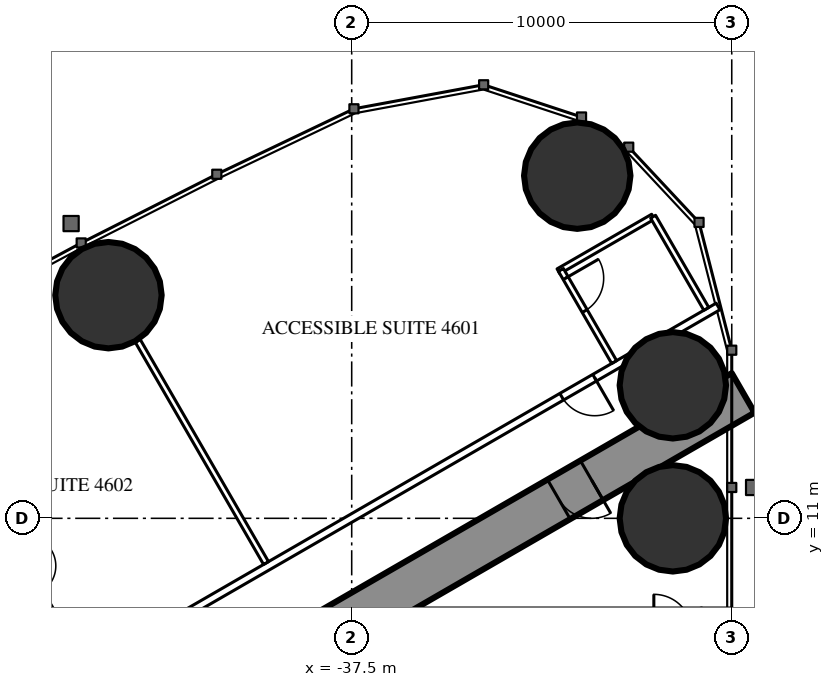
"""IFC4 building model, lengths in metres.
Left out: names, types, materials, properties, quantities, classifications, styles, units other than length and angle.
Written with IfcOpenShell. Run it as: python <this file> out.ifc"""

import sys

from ifc_helpers import new_model, si_unit, direction, frame, frame_2d, origin, origin_2d, place, context, subcontext, project, spatial, rectangle, circle, extrude, element, fill, save


model = new_model("IFC4")
c1 = context("Model", 3, precision=1e-05, world=origin(), true_north=direction((0.0, 1.0)))
c2 = subcontext(c1, "Body", "Model", "MODEL_VIEW")
j1 = project(units=[si_unit("LENGTHUNIT", "METRE"), si_unit("PLANEANGLEUNIT", "RADIAN")], contexts=[c1])
p1 = place(None, origin())
s1 = spatial("IfcSite", under=j1, at=p1, CompositionType="ELEMENT")
p2 = place(p1, origin())
s2 = spatial("IfcBuilding", under=s1, at=p2, CompositionType="ELEMENT")
p3 = place(p2, frame((0.0, 0.0, 173.8)))
s3 = spatial("IfcBuildingStorey", under=s2, at=p3, CompositionType="ELEMENT", Elevation=173.8)
for number, where, z_axis, x_axis in (
    (1, (-31.565, 20.016, 0.0), (0.0, 0.0, 1.0), (1.0, 0.0, 0.0)),
    (2, (-29.05, 11.0, 0.0), (0.0, 0.0, 1.0), (1.0, 0.0, 0.0)),
    (3, (-29.05, 14.5, 0.0), (0.0, 0.0, 1.0), (1.0, 0.0, 0.0)),
    (4, (-43.9, 16.871, 0.0), (0.0, 0.0, 1.0), (1.0, 0.0, 0.0)),
):
    element("IfcColumn", number, at=place(p3, frame(where, z_axis=z_axis, x_axis=x_axis)), inside=s3, PredefinedType="COLUMN", context=c2, shape_type="SweptSolid", body=[
        extrude(circle(Radius=1.4, at=origin_2d()), origin(), (0.0, 0.0, 1.0), 3.5),
    ])
p4 = place(p3, frame((-27.2, 14.3, 0.0), z_axis=(0.0, 0.0, 1.0), x_axis=(-0.866026593062, -0.499997940104, 0.0)))
e5 = element("IfcWall", 5, at=p4, inside=s3, PredefinedType="SHEAR", context=c2, shape_type="SweptSolid", body=[
    extrude(rectangle(XDim=28.946, YDim=1.2, at=frame_2d((14.473, 0.0))), origin(), (0.0, 0.0, 1.0), 3.5),
])
p5 = place(p4, frame((4.6, 0.0, 0.0)))
e6 = element("IfcOpeningElement", 6, at=p5, cuts=e5, PredefinedType="OPENING", context=c2, shape_type="SweptSolid", body=[
    extrude(rectangle(XDim=1.0, YDim=2.2, at=frame_2d((0.5, 1.1))), frame((0.0, 0.61, 0.0), z_axis=(0.0, -1.0, 0.0), x_axis=(1.0, 0.0, 0.0)), (0.0, 0.0, 1.0), 1.22),
])
p6 = place(p4, frame((13.395, 0.0, 0.0)))
e7 = element("IfcOpeningElement", 7, at=p6, cuts=e5, PredefinedType="OPENING", context=c2, shape_type="SweptSolid", body=[
    extrude(rectangle(XDim=1.8, YDim=2.2, at=frame_2d((0.9, 1.1))), frame((0.0, 0.61, 0.0), z_axis=(0.0, -1.0, 0.0), x_axis=(1.0, 0.0, 0.0)), (0.0, 0.0, 1.0), 1.22),
])
p7 = place(p3, frame((-27.86, 16.575, 0.0), z_axis=(0.0, 0.0, 1.0), x_axis=(-0.866025533911, -0.499999774615, 0.0)))
e8 = element("IfcWall", 8, at=p7, inside=s3, PredefinedType="PARTITIONING", context=c2, shape_type="SweptSolid", body=[
    extrude(rectangle(XDim=33.149, YDim=0.2, at=frame_2d((16.575, 0.0))), origin(), (0.0, 0.0, 1.0), 3.25),
])
p8 = place(p7, frame((3.75, 0.0, 0.0)))
e9 = element("IfcOpeningElement", 9, at=p8, cuts=e8, PredefinedType="OPENING", context=c2, shape_type="SweptSolid", body=[
    extrude(rectangle(XDim=1.0, YDim=2.2, at=frame_2d((0.5, 1.1))), frame((0.0, 0.11, 0.0), z_axis=(0.0, -1.0, 0.0), x_axis=(1.0, 0.0, 0.0)), (0.0, 0.0, 1.0), 0.22),
])
p9 = place(p7, frame((20.347, 0.0, 0.0)))
e10 = element("IfcOpeningElement", 10, at=p9, cuts=e8, PredefinedType="OPENING", context=c2, shape_type="SweptSolid", body=[
    extrude(rectangle(XDim=0.95, YDim=2.2, at=frame_2d((0.475, 1.1))), frame((0.0, 0.11, 0.0), z_axis=(0.0, -1.0, 0.0), x_axis=(1.0, 0.0, 0.0)), (0.0, 0.0, 1.0), 0.22),
])
p10 = place(p7, frame((24.397, 0.0, 0.0)))
e11 = element("IfcOpeningElement", 11, at=p10, cuts=e8, PredefinedType="OPENING", context=c2, shape_type="SweptSolid", body=[
    extrude(rectangle(XDim=0.95, YDim=2.2, at=frame_2d((0.475, 1.1))), frame((0.0, 0.11, 0.0), z_axis=(0.0, -1.0, 0.0), x_axis=(1.0, 0.0, 0.0)), (0.0, 0.0, 1.0), 0.22),
])
p11 = place(p7, frame((30.042, 0.0, 0.0)))
e12 = element("IfcOpeningElement", 12, at=p11, cuts=e8, PredefinedType="OPENING", context=c2, shape_type="SweptSolid", body=[
    extrude(rectangle(XDim=0.95, YDim=2.2, at=frame_2d((0.475, 1.1))), frame((0.0, 0.11, 0.0), z_axis=(0.0, -1.0, 0.0), x_axis=(1.0, 0.0, 0.0)), (0.0, 0.0, 1.0), 0.22),
])
p12 = place(p3, frame((-39.754, 9.823, 0.0), z_axis=(0.0, 0.0, 1.0), x_axis=(-0.499997670926, 0.866026748472, 0.0)))
e13 = element("IfcWall", 13, at=p12, inside=s3, PredefinedType="PARTITIONING", context=c2, shape_type="SweptSolid", body=[
    extrude(rectangle(XDim=6.757, YDim=0.15, at=frame_2d((3.379, 0.0))), origin(), (0.0, 0.0, 1.0), 2.3),
])
p13 = place(p3, frame((-29.57, 18.936, 0.0), z_axis=(0.0, 0.0, 1.0), x_axis=(-0.866018712932, -0.500011588718, 0.0)))
e14 = element("IfcWall", 14, at=p13, inside=s3, PredefinedType="PARTITIONING", context=c2, shape_type="SweptSolid", body=[
    extrude(rectangle(XDim=2.875, YDim=0.15, at=frame_2d((1.438, 0.0))), origin(), (0.0, 0.0, 1.0), 3.25),
])
p14 = place(p3, frame((-30.595, 15.111, 0.0), z_axis=(0.0, 0.0, 1.0), x_axis=(-0.49998411664, 0.866034573852, 0.0)))
e15 = element("IfcWall", 15, at=p14, inside=s3, PredefinedType="PARTITIONING", context=c2, shape_type="SweptSolid", body=[
    extrude(rectangle(XDim=2.8, YDim=0.15, at=frame_2d((1.4, 0.0))), origin(), (0.0, 0.0, 1.0), 3.25),
])
p15 = place(p14, frame((1.55, 0.0, 0.0)))
e16 = element("IfcOpeningElement", 16, at=p15, cuts=e15, PredefinedType="OPENING", context=c2, shape_type="SweptSolid", body=[
    extrude(rectangle(XDim=1.0, YDim=2.2, at=frame_2d((0.5, 1.1))), frame((0.0, 0.085, 0.0), z_axis=(0.0, -1.0, 0.0), x_axis=(1.0, 0.0, 0.0)), (0.0, 0.0, 1.0), 0.17),
])
p16 = place(p3, frame((-28.17, 16.511, 0.0), z_axis=(0.0, 0.0, 1.0), x_axis=(-0.49994636267, 0.866056369097, 0.0)))
e17 = element("IfcWall", 17, at=p16, inside=s3, PredefinedType="PARTITIONING", context=c2, shape_type="SweptSolid", body=[
    extrude(rectangle(XDim=2.8, YDim=0.15, at=frame_2d((1.4, 0.0))), origin(), (0.0, 0.0, 1.0), 3.25),
])
p17 = place(p3, frame((-45.235, 8.275, 0.0), z_axis=(0.0, 0.0, 1.0), x_axis=(-0.500006934395, 0.866021400173, 0.0)))
e18 = element("IfcWall", 18, at=p17, inside=s3, PredefinedType="PARTITIONING", context=c2, shape_type="SweptSolid", body=[
    extrude(rectangle(XDim=2.6, YDim=0.15, at=frame_2d((1.3, 0.0))), origin(), (0.0, 0.0, 1.0), 3.25),
])
p18 = place(p17, frame((0.9, 0.0, 0.0)))
e19 = element("IfcOpeningElement", 19, at=p18, cuts=e18, PredefinedType="OPENING", context=c2, shape_type="SweptSolid", body=[
    extrude(rectangle(XDim=0.8, YDim=2.2, at=frame_2d((0.4, 1.1))), frame((0.0, 0.085, 0.0), z_axis=(0.0, -1.0, 0.0), x_axis=(1.0, 0.0, 0.0)), (0.0, 0.0, 1.0), 0.17),
])
p19 = place(p15, origin())
e20 = element("IfcDoor", 20, at=p19, inside=s3, OperationType="SINGLE_SWING_RIGHT", PredefinedType="DOOR", context=c2, shape_type="SweptSolid", body=[
    extrude(rectangle(XDim=1.0, YDim=2.2, at=frame_2d((0.5, 1.1))), frame((0.0, 0.025, 0.0), z_axis=(0.0, -1.0, 0.0), x_axis=(1.0, 0.0, 0.0)), (0.0, 0.0, 1.0), 0.05),
])
fill(e16, e20)
p20 = place(p8, origin())
e21 = element("IfcDoor", 21, at=p20, inside=s3, OperationType="SINGLE_SWING_LEFT", PredefinedType="DOOR", context=c2, shape_type="SweptSolid", body=[
    extrude(rectangle(XDim=1.0, YDim=2.2, at=frame_2d((0.5, 1.1))), frame((0.0, 0.025, 0.0), z_axis=(0.0, -1.0, 0.0), x_axis=(1.0, 0.0, 0.0)), (0.0, 0.0, 1.0), 0.05),
])
fill(e9, e21)
p21 = place(p5, origin())
e22 = element("IfcDoor", 22, at=p21, inside=s3, OperationType="SINGLE_SWING_LEFT", PredefinedType="DOOR", context=c2, shape_type="SweptSolid", body=[
    extrude(rectangle(XDim=1.0, YDim=2.2, at=frame_2d((0.5, 1.1))), frame((0.0, 0.025, 0.0), z_axis=(0.0, -1.0, 0.0), x_axis=(1.0, 0.0, 0.0)), (0.0, 0.0, 1.0), 0.05),
])
fill(e6, e22)
save(model, sys.argv[1])
